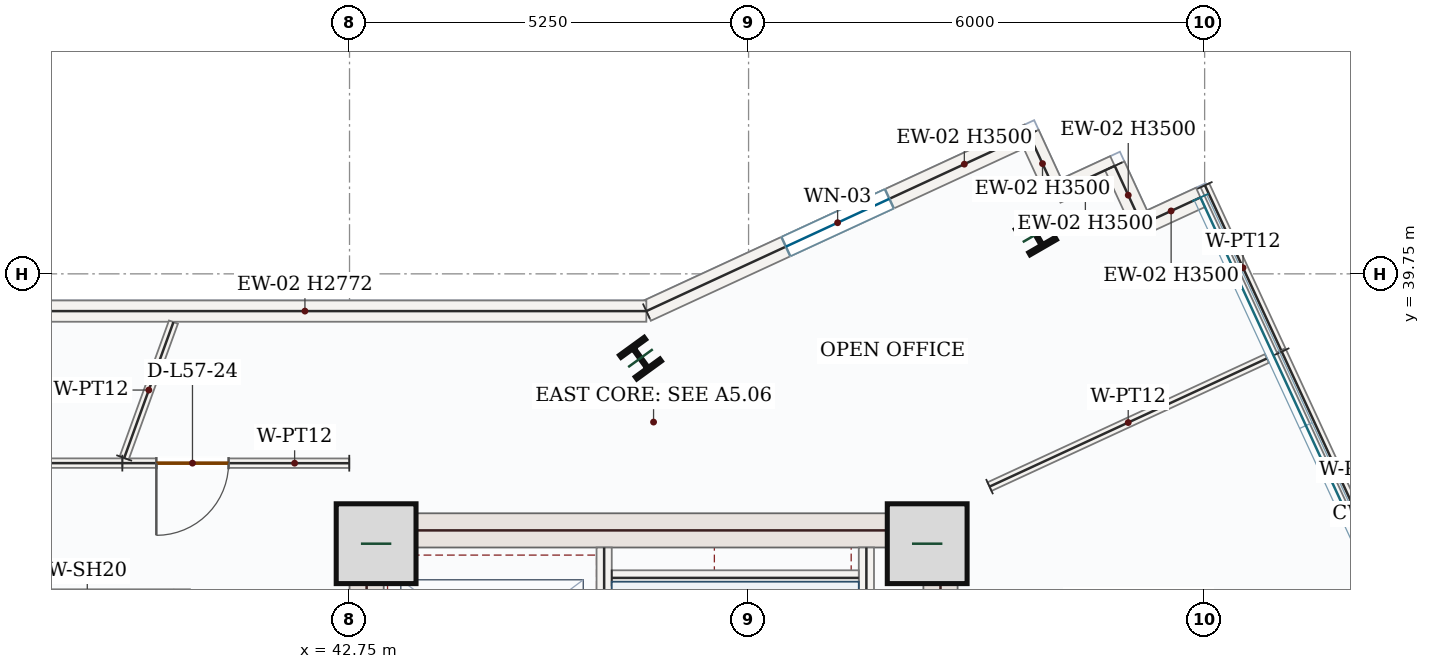
"""IFC4 building model, lengths in metres.
Left out: names, types, materials, properties, quantities, classifications, styles, units other than length and angle.
Written with IfcOpenShell. Run it as: python <this file> out.ifc"""

import sys

from ifc_helpers import new_model, si_unit, direction, frame, frame_2d, origin, origin_2d, place, context, subcontext, project, spatial, rectangle, i_section, extrude, source, transform, mapped, element, fill, save


model = new_model("IFC4")
c1 = context("Model", 3, precision=1e-05, world=origin(), true_north=direction((0.0, 1.0)))
c2 = subcontext(c1, "Body", "Model", "MODEL_VIEW")
j1 = project(units=[si_unit("LENGTHUNIT", "METRE"), si_unit("PLANEANGLEUNIT", "RADIAN")], contexts=[c1])
p1 = place(None, origin())
s1 = spatial("IfcSite", under=j1, at=p1, CompositionType="ELEMENT")
p2 = place(p1, origin())
s2 = spatial("IfcBuilding", under=s1, at=p2, CompositionType="ELEMENT")
p3 = place(p2, frame((0.0, 0.0, 242.85)))
s3 = spatial("IfcBuildingStorey", under=s2, at=p3, CompositionType="ELEMENT", Elevation=242.85)
p4 = place(p3, frame((42.975, 28.05, 0.0), z_axis=(0.0, 0.0, 1.0), x_axis=(0.0, 1.0, 0.0)))
e1 = element("IfcWall", 1, at=p4, inside=s3, PredefinedType="SHEAR", context=c2, shape_type="SweptSolid", body=[
    extrude(rectangle(XDim=8.55, YDim=0.45, at=frame_2d((4.275, 0.0))), origin(), (0.0, 0.0, 1.0), 3.5),
])
p5 = place(p4, frame((1.5, 0.0, 0.0)))
e2 = element("IfcOpeningElement", 2, at=p5, cuts=e1, PredefinedType="OPENING", context=c2, shape_type="SweptSolid", body=[
    extrude(rectangle(XDim=1.1, YDim=2.2, at=frame_2d((0.55, 1.1))), frame((0.0, 0.235, 0.0), z_axis=(0.0, -1.0, 0.0), x_axis=(1.0, 0.0, 0.0)), (0.0, 0.0, 1.0), 0.47),
])
m1 = source(origin(), c2, "Body", "SweptSolid", [
    extrude(rectangle(XDim=8.55, YDim=0.45, at=frame_2d((4.275, 0.0))), origin(), (0.0, 0.0, 1.0), 3.5),
])
p6 = place(p3, frame((50.525, 28.05, 0.0), z_axis=(0.0, 0.0, 1.0), x_axis=(0.0, 1.0, 0.0)))
e3 = element("IfcWall", 3, at=p6, inside=s3, PredefinedType="SHEAR", context=c2, shape_type="MappedRepresentation", body=[
    mapped(m1, transform((0.0, 0.0, 0.0), x_axis=(1.0, 0.0, 0.0), y_axis=(0.0, 1.0, 0.0), z_axis=(0.0, 0.0, 1.0), scale=1.0)),
])
m2 = source(origin(), c2, "Body", "SweptSolid", [
    extrude(rectangle(XDim=7.1, YDim=0.45, at=frame_2d((3.55, 0.0))), origin(), (0.0, 0.0, 1.0), 3.5),
])
p7 = place(p3, frame((43.2, 36.375, 0.0), z_axis=(0.0, 0.0, 1.0), x_axis=(1.0, 0.0, 0.0)))
e4 = element("IfcWall", 4, at=p7, inside=s3, PredefinedType="SHEAR", context=c2, shape_type="MappedRepresentation", body=[
    mapped(m2, transform((0.0, 0.0, 0.0), x_axis=(1.0, 0.0, 0.0), y_axis=(0.0, 1.0, 0.0), z_axis=(0.0, 0.0, 1.0), scale=1.0)),
])
m3 = source(origin(), c2, "Body", "SweptSolid", [
    extrude(rectangle(XDim=1.05, YDim=1.05, at=origin_2d()), origin(), (0.0, 0.0, 1.0), 3.75),
])
for number, where, z_axis, x_axis in (
    (5, (43.1, 36.2, 0.0), (0.0, 0.0, 1.0), (1.0, 0.0, 0.0)),
    (6, (50.35, 36.2, 0.0), (0.0, 0.0, 1.0), (1.0, 0.0, 0.0)),
):
    element("IfcColumn", number, at=place(p3, frame(where, z_axis=z_axis, x_axis=x_axis)), inside=s3, PredefinedType="COLUMN", context=c2, shape_type="MappedRepresentation", body=[
        mapped(m3, transform((0.0, 0.0, 0.0), x_axis=(1.0, 0.0, 0.0), y_axis=(0.0, 1.0, 0.0), z_axis=(0.0, 0.0, 1.0), scale=1.0)),
    ])
m4 = source(origin(), c2, "Body", "SweptSolid", [
    extrude(i_section(OverallWidth=0.399, OverallDepth=0.386, WebThickness=0.021, FlangeThickness=0.033, FilletRadius=0.018, at=origin_2d()), origin(), (0.0, 0.0, 1.0), 3.75),
])
for number, where, z_axis, x_axis in (
    (7, (46.578, 38.641, 0.0), (0.0, 0.0, 1.0), (0.809, 0.588, 0.0)),
    (8, (51.78, 40.268, 0.0), (0.0, 0.0, 1.0), (0.866, 0.5, 0.0)),
):
    element("IfcColumn", number, at=place(p3, frame(where, z_axis=z_axis, x_axis=x_axis)), inside=s3, PredefinedType="COLUMN", context=c2, shape_type="MappedRepresentation", body=[
        mapped(m4, transform((0.0, 0.0, 0.0), x_axis=(1.0, 0.0, 0.0), y_axis=(0.0, 1.0, 0.0), z_axis=(0.0, 0.0, 1.0), scale=1.0)),
    ])
p8 = place(p3, frame((46.655, 39.26, 0.0), z_axis=(0.0, 0.0, 1.0), x_axis=(0.907767275269, 0.419474163627, 0.0)))
e9 = element("IfcWall", 9, at=p8, inside=s3, PredefinedType="SOLIDWALL", context=c2, shape_type="SweptSolid", body=[
    extrude(rectangle(XDim=5.545, YDim=0.28, at=frame_2d((2.772, 0.0))), origin(), (0.0, 0.0, 1.0), 3.5),
])
p9 = place(p8, frame((2.022, 0.0, 0.85)))
e10 = element("IfcOpeningElement", 10, at=p9, cuts=e9, PredefinedType="OPENING", context=c2, shape_type="SweptSolid", body=[
    extrude(rectangle(XDim=1.5, YDim=1.5, at=frame_2d((0.75, 0.75))), frame((0.0, 0.15, 0.0), z_axis=(0.0, -1.0, 0.0), x_axis=(1.0, 0.0, 0.0)), (0.0, 0.0, 1.0), 0.3),
])
m5 = source(origin(), c2, "Body", "SweptSolid", [
    extrude(rectangle(XDim=0.85, YDim=0.28, at=frame_2d((0.425, 0.0))), origin(), (0.0, 0.0, 1.0), 3.5),
])
p10 = place(p3, frame((51.689, 41.586, 0.0), z_axis=(0.0, 0.0, 1.0), x_axis=(0.419549800563, -0.907732320041, 0.0)))
e11 = element("IfcWall", 11, at=p10, inside=s3, PredefinedType="SOLIDWALL", context=c2, shape_type="MappedRepresentation", body=[
    mapped(m5, transform((0.0, 0.0, 0.0), x_axis=(1.0, 0.0, 0.0), y_axis=(0.0, 1.0, 0.0), z_axis=(0.0, 0.0, 1.0), scale=1.0)),
])
m6 = source(origin(), c2, "Body", "SweptSolid", [
    extrude(rectangle(XDim=0.85, YDim=0.28, at=frame_2d((0.425, 0.0))), origin(), (0.0, 0.0, 1.0), 3.5),
])
p11 = place(p3, frame((52.045, 40.814, 0.0), z_axis=(0.0, 0.0, 1.0), x_axis=(0.907681752694, 0.41965919009, 0.0)))
e12 = element("IfcWall", 12, at=p11, inside=s3, PredefinedType="SOLIDWALL", context=c2, shape_type="MappedRepresentation", body=[
    mapped(m6, transform((0.0, 0.0, 0.0), x_axis=(1.0, 0.0, 0.0), y_axis=(0.0, 1.0, 0.0), z_axis=(0.0, 0.0, 1.0), scale=1.0)),
])
for number, where, z_axis, x_axis in (
    (13, (52.817, 41.171, 0.0), (0.0, 0.0, 1.0), (0.419, -0.908, 0.0)),
    (14, (53.173, 40.399, 0.0), (0.0, 0.0, 1.0), (0.908, 0.419, 0.0)),
):
    element("IfcWall", number, at=place(p3, frame(where, z_axis=z_axis, x_axis=x_axis)), inside=s3, PredefinedType="SOLIDWALL", context=c2, shape_type="MappedRepresentation", body=[
        mapped(m5, transform((0.0, 0.0, 0.0), x_axis=(1.0, 0.0, 0.0), y_axis=(0.0, 1.0, 0.0), z_axis=(0.0, 0.0, 1.0), scale=1.0)),
    ])
m7 = source(origin(), c2, "Body", "SweptSolid", [
    extrude(rectangle(XDim=8.984, YDim=0.28, at=frame_2d((4.492, 0.0))), origin(), (0.0, 0.0, 1.0), 2.772),
])
p12 = place(p3, frame((37.672, 39.26, 0.0), z_axis=(0.0, 0.0, 1.0), x_axis=(1.0, 0.0, 0.0)))
e15 = element("IfcWall", 15, at=p12, inside=s3, PredefinedType="SOLIDWALL", context=c2, shape_type="MappedRepresentation", body=[
    mapped(m7, transform((0.0, 0.0, 0.0), x_axis=(1.0, 0.0, 0.0), y_axis=(0.0, 1.0, 0.0), z_axis=(0.0, 0.0, 1.0), scale=1.0)),
])
m8 = source(origin(), c2, "Body", "SweptSolid", [
    extrude(rectangle(XDim=7.87, YDim=0.2, at=frame_2d((3.935, 0.0))), origin(), (0.0, 0.0, 1.0), 3.5),
])
p13 = place(p3, frame((49.55, 28.28, 0.0), z_axis=(0.0, 0.0, 1.0), x_axis=(0.0, 1.0, 0.0)))
e16 = element("IfcWall", 16, at=p13, inside=s3, PredefinedType="SOLIDWALL", context=c2, shape_type="MappedRepresentation", body=[
    mapped(m8, transform((0.0, 0.0, 0.0), x_axis=(1.0, 0.0, 0.0), y_axis=(0.0, 1.0, 0.0), z_axis=(0.0, 0.0, 1.0), scale=1.0)),
])
p14 = place(p3, frame((46.1, 28.15, 0.0), z_axis=(0.0, 0.0, 1.0), x_axis=(0.0, 1.0, 0.0)))
e17 = element("IfcWall", 17, at=p14, inside=s3, PredefinedType="SOLIDWALL", context=c2, shape_type="SweptSolid", body=[
    extrude(rectangle(XDim=8.0, YDim=0.2, at=frame_2d((4.0, 0.0))), origin(), (0.0, 0.0, 1.0), 3.5),
])
p15 = place(p14, frame((0.4, 0.0, 0.0)))
e18 = element("IfcOpeningElement", 18, at=p15, cuts=e17, PredefinedType="OPENING", context=c2, shape_type="SweptSolid", body=[
    extrude(rectangle(XDim=1.05, YDim=2.15, at=frame_2d((0.525, 1.075))), frame((0.0, 0.11, 0.0), z_axis=(0.0, -1.0, 0.0), x_axis=(1.0, 0.0, 0.0)), (0.0, 0.0, 1.0), 0.22),
])
m9 = source(origin(), c2, "Body", "SweptSolid", [
    extrude(rectangle(XDim=3.25, YDim=0.2, at=frame_2d((1.625, 0.0))), origin(), (0.0, 0.0, 1.0), 3.5),
])
p16 = place(p3, frame((46.2, 35.75, 0.0), z_axis=(0.0, 0.0, 1.0), x_axis=(1.0, 0.0, 0.0)))
e19 = element("IfcWall", 19, at=p16, inside=s3, PredefinedType="SOLIDWALL", context=c2, shape_type="MappedRepresentation", body=[
    mapped(m9, transform((0.0, 0.0, 0.0), x_axis=(1.0, 0.0, 0.0), y_axis=(0.0, 1.0, 0.0), z_axis=(0.0, 0.0, 1.0), scale=1.0)),
])
p17 = place(p3, frame((40.55, 33.2, 0.0), z_axis=(0.0, 0.0, 1.0), x_axis=(0.0, 1.0, 0.0)))
e20 = element("IfcWall", 20, at=p17, inside=s3, PredefinedType="SOLIDWALL", context=c2, shape_type="SweptSolid", body=[
    extrude(rectangle(XDim=2.4, YDim=0.2, at=frame_2d((1.2, 0.0))), origin(), (0.0, 0.0, 1.0), 3.5),
])
p18 = place(p17, frame((0.65, 0.0, 0.0)))
e21 = element("IfcOpeningElement", 21, at=p18, cuts=e20, PredefinedType="OPENING", context=c2, shape_type="SweptSolid", body=[
    extrude(rectangle(XDim=1.1, YDim=2.15, at=frame_2d((0.55, 1.075))), frame((0.0, 0.11, 0.0), z_axis=(0.0, -1.0, 0.0), x_axis=(1.0, 0.0, 0.0)), (0.0, 0.0, 1.0), 0.22),
])
m10 = source(origin(), c2, "Body", "SweptSolid", [
    extrude(rectangle(XDim=4.02, YDim=0.125, at=frame_2d((2.01, 0.0))), origin(), (0.0, 0.0, 1.0), 3.5),
])
p19 = place(p3, frame((51.17, 36.951, 0.0), z_axis=(0.0, 0.0, 1.0), x_axis=(0.907776222313, 0.419454801145, 0.0)))
e22 = element("IfcWall", 22, at=p19, inside=s3, PredefinedType="PARTITIONING", context=c2, shape_type="MappedRepresentation", body=[
    mapped(m10, transform((0.0, 0.0, 0.0), x_axis=(1.0, 0.0, 0.0), y_axis=(0.0, 1.0, 0.0), z_axis=(0.0, 0.0, 1.0), scale=1.0)),
])
m11 = source(origin(), c2, "Body", "SweptSolid", [
    extrude(rectangle(XDim=4.72, YDim=0.125, at=frame_2d((2.36, 0.0))), origin(), (0.0, 0.0, 1.0), 3.5),
])
p20 = place(p3, frame((55.015, 38.727, 0.0), z_axis=(0.0, 0.0, 1.0), x_axis=(0.419422223592, -0.907791274665, 0.0)))
e23 = element("IfcWall", 23, at=p20, inside=s3, PredefinedType="PARTITIONING", context=c2, shape_type="MappedRepresentation", body=[
    mapped(m11, transform((0.0, 0.0, 0.0), x_axis=(1.0, 0.0, 0.0), y_axis=(0.0, 1.0, 0.0), z_axis=(0.0, 0.0, 1.0), scale=1.0)),
])
p21 = place(p3, frame((42.747, 37.259, 0.0), z_axis=(0.0, 0.0, 1.0), x_axis=(-0.999999916415, 0.000408864141, 0.0)))
e24 = element("IfcWall", 24, at=p21, inside=s3, PredefinedType="PARTITIONING", context=c2, shape_type="SweptSolid", body=[
    extrude(rectangle(XDim=2.986, YDim=0.125, at=frame_2d((1.493, 0.0))), origin(), (0.0, 0.0, 1.0), 3.5),
])
p22 = place(p21, frame((1.588, 0.0, 0.0)))
e25 = element("IfcOpeningElement", 25, at=p22, cuts=e24, PredefinedType="OPENING", context=c2, shape_type="SweptSolid", body=[
    extrude(rectangle(XDim=0.95, YDim=2.15, at=frame_2d((0.475, 1.075))), frame((0.0, 0.073, 0.0), z_axis=(0.0, -1.0, 0.0), x_axis=(1.0, 0.0, 0.0)), (0.0, 0.0, 1.0), 0.145),
])
m12 = source(origin(), c2, "Body", "SweptSolid", [
    extrude(rectangle(XDim=1.901, YDim=0.125, at=frame_2d((0.951, 0.0))), origin(), (0.0, 0.0, 1.0), 3.5),
])
p23 = place(p3, frame((39.785, 37.327, 0.0), z_axis=(0.0, 0.0, 1.0), x_axis=(0.340887270823, 0.940104179648, 0.0)))
e26 = element("IfcWall", 26, at=p23, inside=s3, PredefinedType="PARTITIONING", context=c2, shape_type="MappedRepresentation", body=[
    mapped(m12, transform((0.0, 0.0, 0.0), x_axis=(1.0, 0.0, 0.0), y_axis=(0.0, 1.0, 0.0), z_axis=(0.0, 0.0, 1.0), scale=1.0)),
])
m13 = source(origin(), c2, "Body", "SweptSolid", [
    extrude(rectangle(XDim=2.39, YDim=0.125, at=frame_2d((1.195, 0.0))), origin(), (0.0, 0.0, 1.0), 3.5),
])
p24 = place(p3, frame((54.004, 40.915, 0.0), z_axis=(0.0, 0.0, 1.0), x_axis=(0.419459790898, -0.907773916688, 0.0)))
e27 = element("IfcWall", 27, at=p24, inside=s3, PredefinedType="PARTITIONING", context=c2, shape_type="MappedRepresentation", body=[
    mapped(m13, transform((0.0, 0.0, 0.0), x_axis=(1.0, 0.0, 0.0), y_axis=(0.0, 1.0, 0.0), z_axis=(0.0, 0.0, 1.0), scale=1.0)),
])
p25 = place(p3, frame((39.761, 37.26, 0.0), z_axis=(0.0, 0.0, 1.0), x_axis=(-1.0, 0.0, 0.0)))
e28 = element("IfcWall", 28, at=p25, inside=s3, PredefinedType="PARTITIONING", context=c2, shape_type="SweptSolid", body=[
    extrude(rectangle(XDim=6.221, YDim=0.125, at=frame_2d((3.111, 0.0))), origin(), (0.0, 0.0, 1.0), 3.5),
])
p26 = place(p25, frame((3.427, 0.0, 0.0)))
e29 = element("IfcOpeningElement", 29, at=p26, cuts=e28, PredefinedType="OPENING", context=c2, shape_type="SweptSolid", body=[
    extrude(rectangle(XDim=0.95, YDim=2.15, at=frame_2d((0.475, 1.075))), frame((0.0, 0.073, 0.0), z_axis=(0.0, -1.0, 0.0), x_axis=(1.0, 0.0, 0.0)), (0.0, 0.0, 1.0), 0.145),
])
m14 = source(origin(), c2, "Body", "SweptSolid", [
    extrude(rectangle(XDim=1.5, YDim=1.5, at=frame_2d((0.75, 0.75))), frame((0.0, 0.03, 0.0), z_axis=(0.0, -1.0, 0.0), x_axis=(1.0, 0.0, 0.0)), (0.0, 0.0, 1.0), 0.06),
])
p27 = place(p9, origin())
e30 = element("IfcWindow", 30, at=p27, inside=s3, PartitioningType="SINGLE_PANEL", PredefinedType="WINDOW", context=c2, shape_type="MappedRepresentation", body=[
    mapped(m14, transform((0.0, 0.0, 0.0), x_axis=(1.0, 0.0, 0.0), y_axis=(0.0, 1.0, 0.0), z_axis=(0.0, 0.0, 1.0), scale=1.0)),
])
fill(e10, e30)
m15 = source(origin(), c2, "Body", "SweptSolid", [
    extrude(rectangle(XDim=0.95, YDim=2.15, at=frame_2d((0.475, 1.075))), frame((0.0, 0.025, 0.0), z_axis=(0.0, -1.0, 0.0), x_axis=(1.0, 0.0, 0.0)), (0.0, 0.0, 1.0), 0.05),
])
p28 = place(p22, origin())
e31 = element("IfcDoor", 31, at=p28, inside=s3, OperationType="SINGLE_SWING_RIGHT", PredefinedType="DOOR", context=c2, shape_type="MappedRepresentation", body=[
    mapped(m15, transform((0.0, 0.0, 0.0), x_axis=(1.0, 0.0, 0.0), y_axis=(0.0, 1.0, 0.0), z_axis=(0.0, 0.0, 1.0), scale=1.0)),
])
fill(e25, e31)
save(model, sys.argv[1])
